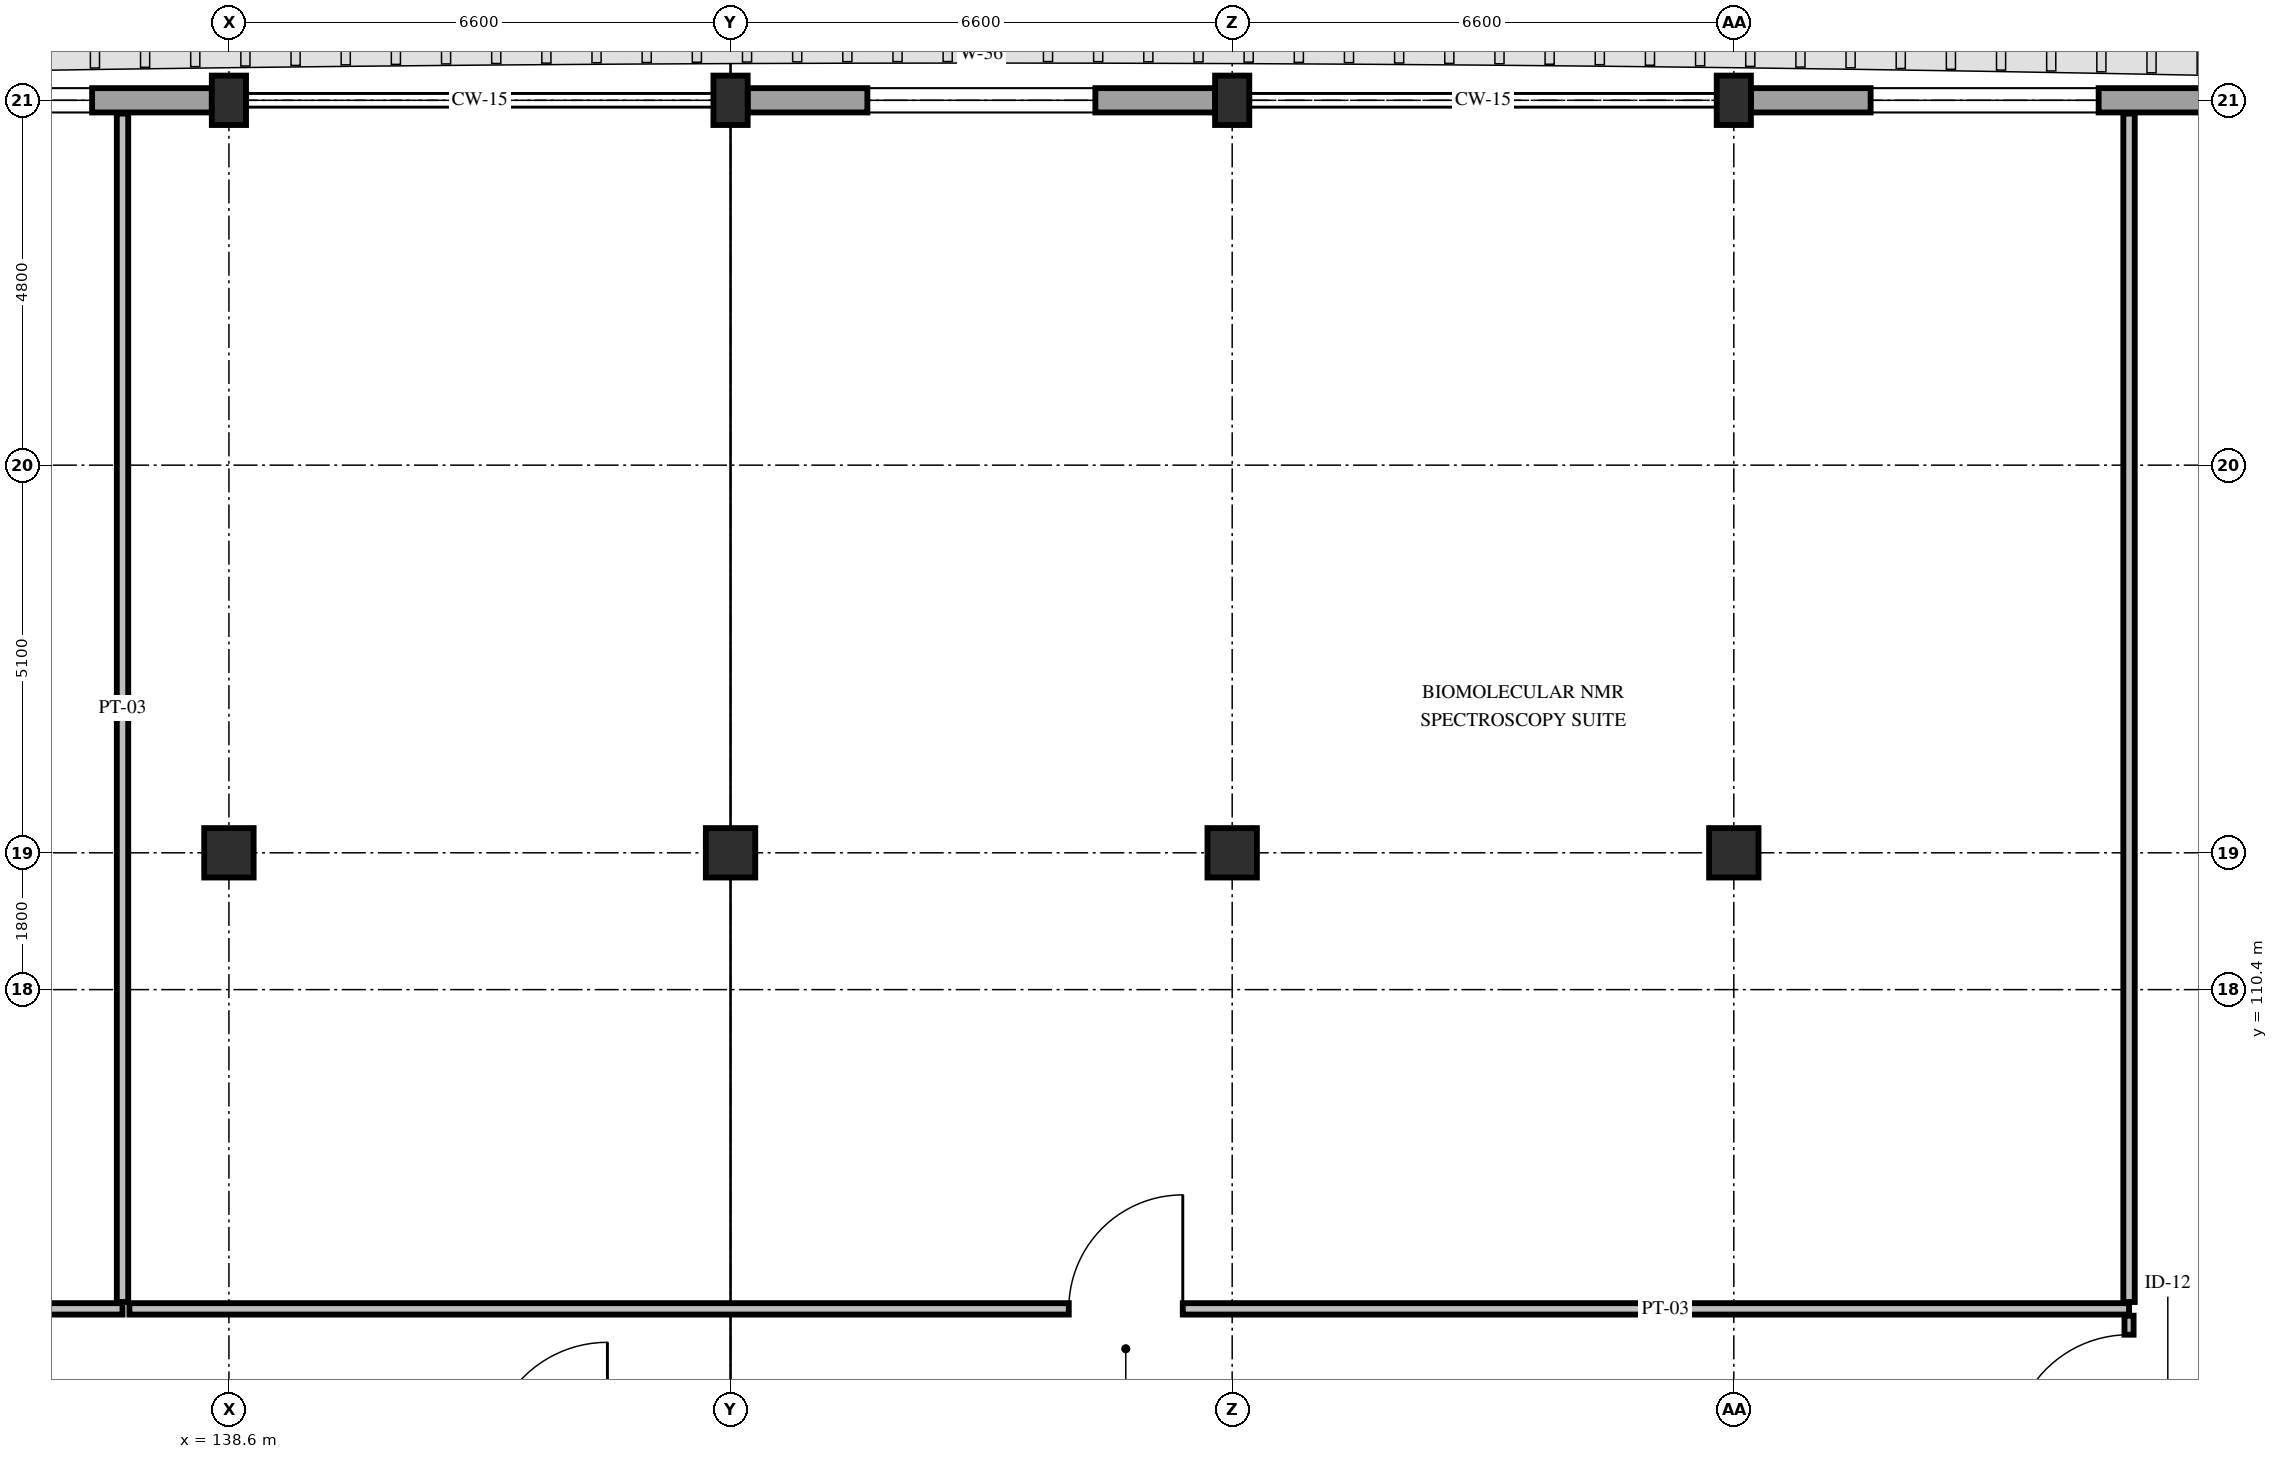
"""IFC4 building model, lengths in metres.
Left out: names, types, materials, properties, quantities, classifications, styles, units other than length and angle.
Written with IfcOpenShell. Run it as: python <this file> out.ifc"""

import sys

from ifc_helpers import new_model, si_unit, direction, frame, frame_2d, origin, origin_2d, place, context, subcontext, project, spatial, rectangle, extrude, element, fill, save


model = new_model("IFC4")
c1 = context("Model", 3, precision=1e-05, world=origin(), true_north=direction((0.0, 1.0)))
c2 = subcontext(c1, "Body", "Model", "MODEL_VIEW")
j1 = project(units=[si_unit("LENGTHUNIT", "METRE"), si_unit("PLANEANGLEUNIT", "RADIAN")], contexts=[c1])
p1 = place(None, origin())
s1 = spatial("IfcSite", under=j1, at=p1, CompositionType="ELEMENT")
p2 = place(p1, origin())
s2 = spatial("IfcBuilding", under=s1, at=p2, CompositionType="ELEMENT")
p3 = place(p2, frame((0.0, 0.0, 19.8)))
s3 = spatial("IfcBuildingStorey", under=s2, at=p3, CompositionType="ELEMENT", Elevation=19.8)
p4 = place(p3, frame((138.6, 112.2, 0.0), z_axis=(0.0, 0.0, 1.0), x_axis=(1.0, 0.0, 0.0)))
e1 = element("IfcColumn", 1, at=p4, inside=s3, PredefinedType="COLUMN", context=c2, shape_type="SweptSolid", body=[
    extrude(rectangle(XDim=0.65, YDim=0.65, at=origin_2d()), origin(), (0.0, 0.0, 1.0), 4.8),
])
p5 = place(p3, frame((138.6, 122.1, 0.0), z_axis=(0.0, 0.0, 1.0), x_axis=(1.0, 0.0, 0.0)))
e2 = element("IfcColumn", 2, at=p5, inside=s3, PredefinedType="PILASTER", context=c2, shape_type="SweptSolid", body=[
    extrude(rectangle(XDim=0.45, YDim=0.65, at=origin_2d()), origin(), (0.0, 0.0, 1.0), 4.8),
])
p6 = place(p3, frame((145.2, 112.2, 0.0), z_axis=(0.0, 0.0, 1.0), x_axis=(1.0, 0.0, 0.0)))
e3 = element("IfcColumn", 3, at=p6, inside=s3, PredefinedType="COLUMN", context=c2, shape_type="SweptSolid", body=[
    extrude(rectangle(XDim=0.65, YDim=0.65, at=origin_2d()), origin(), (0.0, 0.0, 1.0), 4.8),
])
p7 = place(p3, frame((145.2, 122.1, 0.0), z_axis=(0.0, 0.0, 1.0), x_axis=(1.0, 0.0, 0.0)))
e4 = element("IfcColumn", 4, at=p7, inside=s3, PredefinedType="PILASTER", context=c2, shape_type="SweptSolid", body=[
    extrude(rectangle(XDim=0.45, YDim=0.65, at=origin_2d()), origin(), (0.0, 0.0, 1.0), 4.8),
])
p8 = place(p3, frame((151.8, 112.2, 0.0), z_axis=(0.0, 0.0, 1.0), x_axis=(1.0, 0.0, 0.0)))
e5 = element("IfcColumn", 5, at=p8, inside=s3, PredefinedType="COLUMN", context=c2, shape_type="SweptSolid", body=[
    extrude(rectangle(XDim=0.65, YDim=0.65, at=origin_2d()), origin(), (0.0, 0.0, 1.0), 4.8),
])
p9 = place(p3, frame((151.8, 122.1, 0.0), z_axis=(0.0, 0.0, 1.0), x_axis=(1.0, 0.0, 0.0)))
e6 = element("IfcColumn", 6, at=p9, inside=s3, PredefinedType="PILASTER", context=c2, shape_type="SweptSolid", body=[
    extrude(rectangle(XDim=0.45, YDim=0.65, at=origin_2d()), origin(), (0.0, 0.0, 1.0), 4.8),
])
p10 = place(p3, frame((158.4, 112.2, 0.0), z_axis=(0.0, 0.0, 1.0), x_axis=(1.0, 0.0, 0.0)))
e7 = element("IfcColumn", 7, at=p10, inside=s3, PredefinedType="COLUMN", context=c2, shape_type="SweptSolid", body=[
    extrude(rectangle(XDim=0.65, YDim=0.65, at=origin_2d()), origin(), (0.0, 0.0, 1.0), 4.8),
])
p11 = place(p3, frame((158.4, 122.1, 0.0), z_axis=(0.0, 0.0, 1.0), x_axis=(1.0, 0.0, 0.0)))
e8 = element("IfcColumn", 8, at=p11, inside=s3, PredefinedType="PILASTER", context=c2, shape_type="SweptSolid", body=[
    extrude(rectangle(XDim=0.45, YDim=0.65, at=origin_2d()), origin(), (0.0, 0.0, 1.0), 4.8),
])
p12 = place(p3, frame((132.225, 122.1, 0.0), z_axis=(0.0, 0.0, 1.0), x_axis=(1.0, 0.0, 0.0)))
e9 = element("IfcWall", 9, at=p12, inside=s3, PredefinedType="STANDARD", context=c2, shape_type="SweptSolid", body=[
    extrude(rectangle(XDim=6.15, YDim=0.32, at=frame_2d((3.075, 0.0))), origin(), (0.0, 0.0, 1.0), 3.78),
])
p13 = place(p12, frame((1.575, 0.0, 0.85)))
e10 = element("IfcOpeningElement", 10, at=p13, cuts=e9, PredefinedType="OPENING", context=c2, shape_type="SweptSolid", body=[
    extrude(rectangle(XDim=3.0, YDim=1.88, at=frame_2d((1.5, 0.94))), frame((0.0, 0.175, 0.0), z_axis=(0.0, -1.0, 0.0), x_axis=(1.0, 0.0, 0.0)), (0.0, 0.0, 1.0), 0.35),
])
p14 = place(p3, frame((145.425, 122.1, 0.0), z_axis=(0.0, 0.0, 1.0), x_axis=(1.0, 0.0, 0.0)))
e11 = element("IfcWall", 11, at=p14, inside=s3, PredefinedType="STANDARD", context=c2, shape_type="SweptSolid", body=[
    extrude(rectangle(XDim=6.15, YDim=0.32, at=frame_2d((3.075, 0.0))), origin(), (0.0, 0.0, 1.0), 3.78),
])
p15 = place(p14, frame((1.575, 0.0, 0.85)))
e12 = element("IfcOpeningElement", 12, at=p15, cuts=e11, PredefinedType="OPENING", context=c2, shape_type="SweptSolid", body=[
    extrude(rectangle(XDim=3.0, YDim=1.88, at=frame_2d((1.5, 0.94))), frame((0.0, 0.175, 0.0), z_axis=(0.0, -1.0, 0.0), x_axis=(1.0, 0.0, 0.0)), (0.0, 0.0, 1.0), 0.35),
])
p16 = place(p3, frame((158.625, 122.1, 0.0), z_axis=(0.0, 0.0, 1.0), x_axis=(1.0, 0.0, 0.0)))
e13 = element("IfcWall", 13, at=p16, inside=s3, PredefinedType="STANDARD", context=c2, shape_type="SweptSolid", body=[
    extrude(rectangle(XDim=6.15, YDim=0.32, at=frame_2d((3.075, 0.0))), origin(), (0.0, 0.0, 1.0), 3.78),
])
p17 = place(p16, frame((1.575, 0.0, 0.85)))
e14 = element("IfcOpeningElement", 14, at=p17, cuts=e13, PredefinedType="OPENING", context=c2, shape_type="SweptSolid", body=[
    extrude(rectangle(XDim=3.0, YDim=1.88, at=frame_2d((1.5, 0.94))), frame((0.0, 0.175, 0.0), z_axis=(0.0, -1.0, 0.0), x_axis=(1.0, 0.0, 0.0)), (0.0, 0.0, 1.0), 0.35),
])
p18 = place(p3, frame((119.04, 106.2, 0.0), z_axis=(0.0, 0.0, 1.0), x_axis=(1.0, 0.0, 0.0)))
e15 = element("IfcWall", 15, at=p18, inside=s3, PredefinedType="PARTITIONING", context=c2, shape_type="SweptSolid", body=[
    extrude(rectangle(XDim=18.16, YDim=0.15, at=frame_2d((9.08, 0.0))), origin(), (0.0, 0.0, 1.0), 3.78),
])
p19 = place(p18, frame((8.32, 0.0, 0.0)))
e16 = element("IfcOpeningElement", 16, at=p19, cuts=e15, PredefinedType="OPENING", context=c2, shape_type="SweptSolid", body=[
    extrude(rectangle(XDim=1.56, YDim=2.3, at=frame_2d((0.78, 1.15))), frame((0.0, 0.09, 0.0), z_axis=(0.0, -1.0, 0.0), x_axis=(1.0, 0.0, 0.0)), (0.0, 0.0, 1.0), 0.18),
])
p20 = place(p3, frame((137.2, 106.29, 0.0), z_axis=(0.0, 0.0, 1.0), x_axis=(0.0, 1.0, 0.0)))
e17 = element("IfcWall", 17, at=p20, inside=s3, PredefinedType="PARTITIONING", context=c2, shape_type="SweptSolid", body=[
    extrude(rectangle(XDim=15.635, YDim=0.15, at=frame_2d((7.817, 0.0))), origin(), (0.0, 0.0, 1.0), 3.93),
])
p21 = place(p3, frame((137.29, 106.2, 0.0), z_axis=(0.0, 0.0, 1.0), x_axis=(1.0, 0.0, 0.0)))
e18 = element("IfcWall", 18, at=p21, inside=s3, PredefinedType="PARTITIONING", context=c2, shape_type="SweptSolid", body=[
    extrude(rectangle(XDim=26.31, YDim=0.15, at=frame_2d((13.155, 0.0))), origin(), (0.0, 0.0, 1.0), 3.78),
])
p22 = place(p21, frame((12.36, 0.0, 0.0)))
e19 = element("IfcOpeningElement", 19, at=p22, cuts=e18, PredefinedType="OPENING", context=c2, shape_type="SweptSolid", body=[
    extrude(rectangle(XDim=1.5, YDim=2.25, at=frame_2d((0.75, 1.125))), frame((0.0, 0.09, 0.0), z_axis=(0.0, -1.0, 0.0), x_axis=(1.0, 0.0, 0.0)), (0.0, 0.0, 1.0), 0.18),
])
p23 = place(p3, frame((163.6, 106.29, 0.0), z_axis=(0.0, 0.0, 1.0), x_axis=(0.0, 1.0, 0.0)))
e20 = element("IfcWall", 20, at=p23, inside=s3, PredefinedType="PARTITIONING", context=c2, shape_type="SweptSolid", body=[
    extrude(rectangle(XDim=15.635, YDim=0.15, at=frame_2d((7.817, 0.0))), origin(), (0.0, 0.0, 1.0), 3.93),
])
p24 = place(p3, frame((163.6, 102.3, 0.0), z_axis=(0.0, 0.0, 1.0), x_axis=(0.0, 1.0, 0.0)))
e21 = element("IfcWall", 21, at=p24, inside=s3, PredefinedType="PARTITIONING", context=c2, shape_type="SweptSolid", body=[
    extrude(rectangle(XDim=3.81, YDim=0.12, at=frame_2d((1.905, 0.0))), origin(), (0.0, 0.0, 1.0), 4.065),
])
p25 = place(p24, frame((2.02, 0.0, 0.0)))
e22 = element("IfcOpeningElement", 22, at=p25, cuts=e21, PredefinedType="OPENING", context=c2, shape_type="SweptSolid", body=[
    extrude(rectangle(XDim=1.54, YDim=2.25, at=frame_2d((0.77, 1.125))), frame((0.0, 0.075, 0.0), z_axis=(0.0, -1.0, 0.0), x_axis=(1.0, 0.0, 0.0)), (0.0, 0.0, 1.0), 0.15),
])
p26 = place(p13, origin())
e23 = element("IfcWindow", 23, at=p26, inside=s3, PartitioningType="DOUBLE_PANEL_VERTICAL", PredefinedType="WINDOW", context=c2, shape_type="SweptSolid", body=[
    extrude(rectangle(XDim=3.0, YDim=1.88, at=frame_2d((1.5, 0.94))), frame((0.0, 0.03, 0.0), z_axis=(0.0, -1.0, 0.0), x_axis=(1.0, 0.0, 0.0)), (0.0, 0.0, 1.0), 0.06),
])
fill(e10, e23)
p27 = place(p15, origin())
e24 = element("IfcWindow", 24, at=p27, inside=s3, PartitioningType="DOUBLE_PANEL_VERTICAL", PredefinedType="WINDOW", context=c2, shape_type="SweptSolid", body=[
    extrude(rectangle(XDim=3.0, YDim=1.88, at=frame_2d((1.5, 0.94))), frame((0.0, 0.03, 0.0), z_axis=(0.0, -1.0, 0.0), x_axis=(1.0, 0.0, 0.0)), (0.0, 0.0, 1.0), 0.06),
])
fill(e12, e24)
p28 = place(p17, origin())
e25 = element("IfcWindow", 25, at=p28, inside=s3, PartitioningType="DOUBLE_PANEL_VERTICAL", PredefinedType="WINDOW", context=c2, shape_type="SweptSolid", body=[
    extrude(rectangle(XDim=3.0, YDim=1.88, at=frame_2d((1.5, 0.94))), frame((0.0, 0.03, 0.0), z_axis=(0.0, -1.0, 0.0), x_axis=(1.0, 0.0, 0.0)), (0.0, 0.0, 1.0), 0.06),
])
fill(e14, e25)
p29 = place(p22, origin())
e26 = element("IfcDoor", 26, at=p29, inside=s3, OperationType="SINGLE_SWING_RIGHT", PredefinedType="DOOR", context=c2, shape_type="SweptSolid", body=[
    extrude(rectangle(XDim=1.5, YDim=2.25, at=frame_2d((0.75, 1.125))), frame((0.0, 0.025, 0.0), z_axis=(0.0, -1.0, 0.0), x_axis=(1.0, 0.0, 0.0)), (0.0, 0.0, 1.0), 0.05),
])
fill(e19, e26)
p30 = place(p25, origin())
e27 = element("IfcDoor", 27, at=p30, inside=s3, OperationType="SINGLE_SWING_LEFT", PredefinedType="DOOR", context=c2, shape_type="SweptSolid", body=[
    extrude(rectangle(XDim=1.54, YDim=2.25, at=frame_2d((0.77, 1.125))), frame((0.0, 0.025, 0.0), z_axis=(0.0, -1.0, 0.0), x_axis=(1.0, 0.0, 0.0)), (0.0, 0.0, 1.0), 0.05),
])
fill(e22, e27)
save(model, sys.argv[1])
